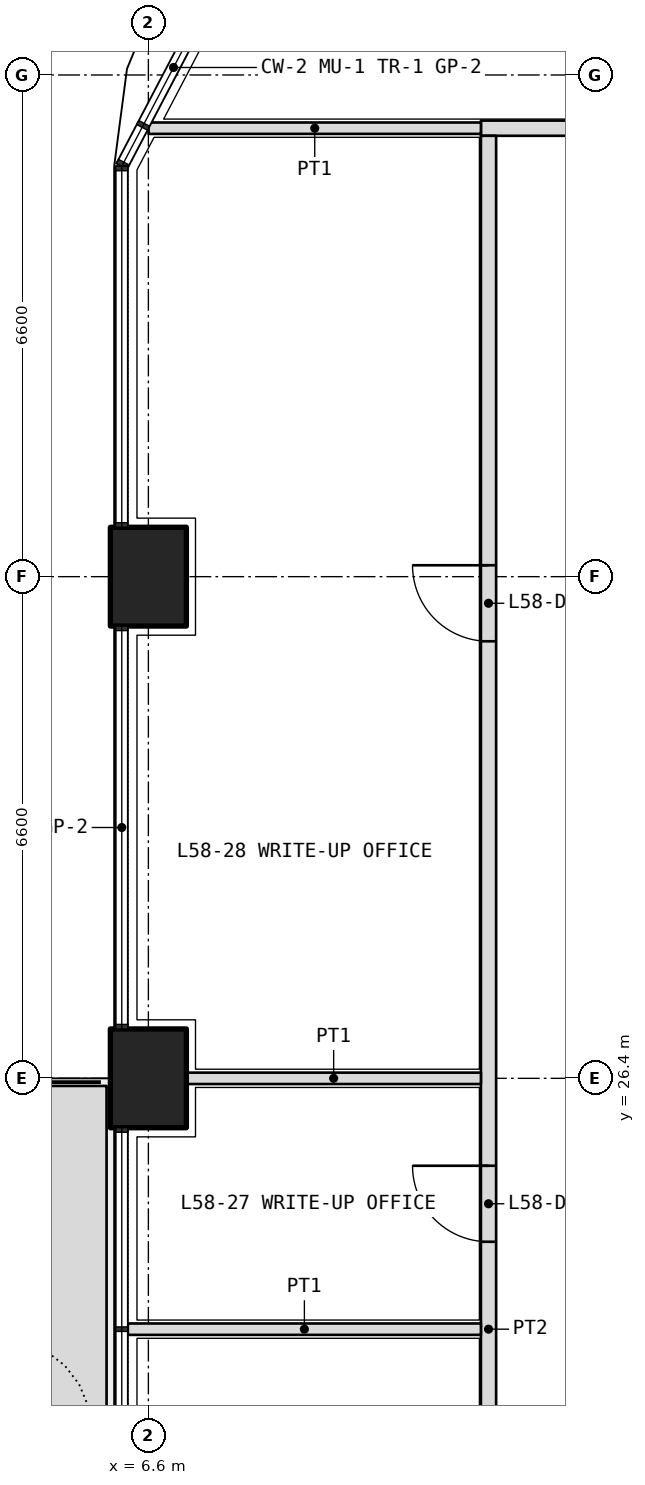
"""IFC4 building model, lengths in metres.
Left out: names, types, materials, properties, quantities, classifications, styles, units other than length and angle.
Written with IfcOpenShell. Run it as: python <this file> out.ifc"""

import sys

from ifc_helpers import new_model, si_unit, direction, frame, frame_2d, origin, origin_2d, place, context, subcontext, project, spatial, polyline, rectangle, outline, extrude, element, fill, save


model = new_model("IFC4")
c1 = context("Model", 3, precision=1e-05, world=origin(), true_north=direction((0.0, 1.0)))
c2 = subcontext(c1, "Body", "Model", "MODEL_VIEW")
j1 = project(units=[si_unit("LENGTHUNIT", "METRE"), si_unit("PLANEANGLEUNIT", "RADIAN")], contexts=[c1])
p1 = place(None, origin())
s1 = spatial("IfcSite", under=j1, at=p1, CompositionType="ELEMENT")
p2 = place(p1, origin())
s2 = spatial("IfcBuilding", under=s1, at=p2, CompositionType="ELEMENT")
p3 = place(p2, frame((0.0, 0.0, 254.4)))
s3 = spatial("IfcBuildingStorey", under=s2, at=p3, CompositionType="ELEMENT", Elevation=254.4)
for number, where, z_axis, x_axis in (
    (1, (6.6, 26.4, 0.0), (0.0, 0.0, 1.0), (0.0, 1.0, 0.0)),
    (2, (6.6, 33.0, 0.0), (0.0, 0.0, 1.0), (0.0, 1.0, 0.0)),
):
    element("IfcColumn", number, at=place(p3, frame(where, z_axis=z_axis, x_axis=x_axis)), inside=s3, PredefinedType="COLUMN", context=c2, shape_type="SweptSolid", body=[
        extrude(rectangle(XDim=1.3, YDim=1.0, at=origin_2d()), origin(), (0.0, 0.0, 1.0), 4.2),
    ])
p4 = place(p3, origin())
e3 = element("IfcWall", 3, at=p4, inside=s3, PredefinedType="USERDEFINED", context=c2, shape_type="SweptSolid", body=[
    extrude(outline(polyline([(5.05, 17.25), (6.05, 17.25), (6.05, 26.3), (5.05, 26.3), (5.05, 17.25)]), holes=[polyline([(5.2, 17.4), (5.9, 17.4), (5.9, 26.15), (5.2, 26.15), (5.2, 17.4)])]), origin(), (0.0, 0.0, 1.0), 1.05),
])
p5 = place(p3, frame((10.975, 38.9, 0.0), z_axis=(0.0, 0.0, 1.0), x_axis=(1.0, 0.0, 0.0)))
e4 = element("IfcWall", 4, at=p5, inside=s3, PredefinedType="PARTITIONING", context=c2, shape_type="SweptSolid", body=[
    extrude(rectangle(XDim=30.85, YDim=0.2, at=frame_2d((15.425, 0.0))), origin(), (0.0, 0.0, 1.0), 3.0),
])
p6 = place(p5, frame((2.312, 0.0, 0.0)))
e5 = element("IfcOpeningElement", 5, at=p6, cuts=e4, PredefinedType="OPENING", context=c2, shape_type="SweptSolid", body=[
    extrude(rectangle(XDim=1.0, YDim=2.1, at=frame_2d((0.5, 1.05))), frame((0.0, 0.11, 0.0), z_axis=(0.0, -1.0, 0.0), x_axis=(1.0, 0.0, 0.0)), (0.0, 0.0, 1.0), 0.22),
])
p7 = place(p5, frame((6.675, 0.0, 0.0)))
e6 = element("IfcOpeningElement", 6, at=p7, cuts=e4, PredefinedType="OPENING", context=c2, shape_type="SweptSolid", body=[
    extrude(rectangle(XDim=1.0, YDim=2.1, at=frame_2d((0.5, 1.05))), frame((0.0, 0.11, 0.0), z_axis=(0.0, -1.0, 0.0), x_axis=(1.0, 0.0, 0.0)), (0.0, 0.0, 1.0), 0.22),
])
p8 = place(p5, frame((14.925, 0.0, 0.0)))
e7 = element("IfcOpeningElement", 7, at=p8, cuts=e4, PredefinedType="OPENING", context=c2, shape_type="SweptSolid", body=[
    extrude(rectangle(XDim=1.0, YDim=2.1, at=frame_2d((0.5, 1.05))), frame((0.0, 0.11, 0.0), z_axis=(0.0, -1.0, 0.0), x_axis=(1.0, 0.0, 0.0)), (0.0, 0.0, 1.0), 0.22),
])
p9 = place(p5, frame((23.625, 0.0, 0.0)))
e8 = element("IfcOpeningElement", 8, at=p9, cuts=e4, PredefinedType="OPENING", context=c2, shape_type="SweptSolid", body=[
    extrude(rectangle(XDim=1.0, YDim=2.1, at=frame_2d((0.5, 1.05))), frame((0.0, 0.11, 0.0), z_axis=(0.0, -1.0, 0.0), x_axis=(1.0, 0.0, 0.0)), (0.0, 0.0, 1.0), 0.22),
])
p10 = place(p5, frame((26.925, 0.0, 0.0)))
e9 = element("IfcOpeningElement", 9, at=p10, cuts=e4, PredefinedType="OPENING", context=c2, shape_type="SweptSolid", body=[
    extrude(rectangle(XDim=1.0, YDim=2.1, at=frame_2d((0.5, 1.05))), frame((0.0, 0.11, 0.0), z_axis=(0.0, -1.0, 0.0), x_axis=(1.0, 0.0, 0.0)), (0.0, 0.0, 1.0), 0.22),
])
p11 = place(p5, frame((29.087, 0.0, 0.0)))
e10 = element("IfcOpeningElement", 10, at=p11, cuts=e4, PredefinedType="OPENING", context=c2, shape_type="SweptSolid", body=[
    extrude(rectangle(XDim=1.2, YDim=2.1, at=frame_2d((0.6, 1.05))), frame((0.0, 0.11, 0.0), z_axis=(0.0, -1.0, 0.0), x_axis=(1.0, 0.0, 0.0)), (0.0, 0.0, 1.0), 0.22),
])
p12 = place(p3, frame((11.075, 7.4, 0.0), z_axis=(0.0, 0.0, 1.0), x_axis=(0.0, 1.0, 0.0)))
e11 = element("IfcWall", 11, at=p12, inside=s3, PredefinedType="PARTITIONING", context=c2, shape_type="SweptSolid", body=[
    extrude(rectangle(XDim=31.4, YDim=0.2, at=frame_2d((15.7, 0.0))), origin(), (0.0, 0.0, 1.0), 3.0),
])
p13 = place(p12, frame((2.35, 0.0, 0.0)))
e12 = element("IfcOpeningElement", 12, at=p13, cuts=e11, PredefinedType="OPENING", context=c2, shape_type="SweptSolid", body=[
    extrude(rectangle(XDim=1.0, YDim=2.1, at=frame_2d((0.5, 1.05))), frame((0.0, 0.11, 0.0), z_axis=(0.0, -1.0, 0.0), x_axis=(1.0, 0.0, 0.0)), (0.0, 0.0, 1.0), 0.22),
])
p14 = place(p12, frame((6.9, 0.0, 0.0)))
e13 = element("IfcOpeningElement", 13, at=p14, cuts=e11, PredefinedType="OPENING", context=c2, shape_type="SweptSolid", body=[
    extrude(rectangle(XDim=1.0, YDim=2.1, at=frame_2d((0.5, 1.05))), frame((0.0, 0.11, 0.0), z_axis=(0.0, -1.0, 0.0), x_axis=(1.0, 0.0, 0.0)), (0.0, 0.0, 1.0), 0.22),
])
p15 = place(p12, frame((10.35, 0.0, 0.0)))
e14 = element("IfcOpeningElement", 14, at=p15, cuts=e11, PredefinedType="OPENING", context=c2, shape_type="SweptSolid", body=[
    extrude(rectangle(XDim=0.9, YDim=2.1, at=frame_2d((0.45, 1.05))), frame((0.0, 0.11, 0.0), z_axis=(0.0, -1.0, 0.0), x_axis=(1.0, 0.0, 0.0)), (0.0, 0.0, 1.0), 0.22),
])
p16 = place(p12, frame((13.7, 0.0, 0.0)))
e15 = element("IfcOpeningElement", 15, at=p16, cuts=e11, PredefinedType="OPENING", context=c2, shape_type="SweptSolid", body=[
    extrude(rectangle(XDim=0.9, YDim=2.1, at=frame_2d((0.45, 1.05))), frame((0.0, 0.11, 0.0), z_axis=(0.0, -1.0, 0.0), x_axis=(1.0, 0.0, 0.0)), (0.0, 0.0, 1.0), 0.22),
])
p17 = place(p12, frame((16.85, 0.0, 0.0)))
e16 = element("IfcOpeningElement", 16, at=p17, cuts=e11, PredefinedType="OPENING", context=c2, shape_type="SweptSolid", body=[
    extrude(rectangle(XDim=1.0, YDim=2.1, at=frame_2d((0.5, 1.05))), frame((0.0, 0.11, 0.0), z_axis=(0.0, -1.0, 0.0), x_axis=(1.0, 0.0, 0.0)), (0.0, 0.0, 1.0), 0.22),
])
p18 = place(p12, frame((24.75, 0.0, 0.0)))
e17 = element("IfcOpeningElement", 17, at=p18, cuts=e11, PredefinedType="OPENING", context=c2, shape_type="SweptSolid", body=[
    extrude(rectangle(XDim=1.0, YDim=2.1, at=frame_2d((0.5, 1.05))), frame((0.0, 0.11, 0.0), z_axis=(0.0, -1.0, 0.0), x_axis=(1.0, 0.0, 0.0)), (0.0, 0.0, 1.0), 0.22),
])
p19 = place(p3, frame((6.603, 38.9, 0.0), z_axis=(0.0, 0.0, 1.0), x_axis=(1.0, 0.0, 0.0)))
e18 = element("IfcWall", 18, at=p19, inside=s3, PredefinedType="PARTITIONING", context=c2, shape_type="SweptSolid", body=[
    extrude(rectangle(XDim=4.373, YDim=0.15, at=frame_2d((2.186, 0.0))), origin(), (0.0, 0.0, 1.0), 2.7),
])
p20 = place(p3, frame((6.33, 23.1, 0.0), z_axis=(0.0, 0.0, 1.0), x_axis=(1.0, 0.0, 0.0)))
e19 = element("IfcWall", 19, at=p20, inside=s3, PredefinedType="PARTITIONING", context=c2, shape_type="SweptSolid", body=[
    extrude(rectangle(XDim=4.645, YDim=0.15, at=frame_2d((2.323, 0.0))), origin(), (0.0, 0.0, 1.0), 2.7),
])
p21 = place(p3, frame((7.1, 26.4, 0.0), z_axis=(0.0, 0.0, 1.0), x_axis=(1.0, 0.0, 0.0)))
e20 = element("IfcWall", 20, at=p21, inside=s3, PredefinedType="PARTITIONING", context=c2, shape_type="SweptSolid", body=[
    extrude(rectangle(XDim=3.875, YDim=0.15, at=frame_2d((1.938, 0.0))), origin(), (0.0, 0.0, 1.0), 3.0),
])
p22 = place(p17, origin())
e21 = element("IfcDoor", 21, at=p22, inside=s3, OperationType="SINGLE_SWING_RIGHT", PredefinedType="DOOR", context=c2, shape_type="SweptSolid", body=[
    extrude(rectangle(XDim=1.0, YDim=2.1, at=frame_2d((0.5, 1.05))), frame((0.0, 0.025, 0.0), z_axis=(0.0, -1.0, 0.0), x_axis=(1.0, 0.0, 0.0)), (0.0, 0.0, 1.0), 0.05),
])
fill(e16, e21)
p23 = place(p18, origin())
e22 = element("IfcDoor", 22, at=p23, inside=s3, OperationType="SINGLE_SWING_RIGHT", PredefinedType="DOOR", context=c2, shape_type="SweptSolid", body=[
    extrude(rectangle(XDim=1.0, YDim=2.1, at=frame_2d((0.5, 1.05))), frame((0.0, 0.025, 0.0), z_axis=(0.0, -1.0, 0.0), x_axis=(1.0, 0.0, 0.0)), (0.0, 0.0, 1.0), 0.05),
])
fill(e17, e22)
save(model, sys.argv[1])
